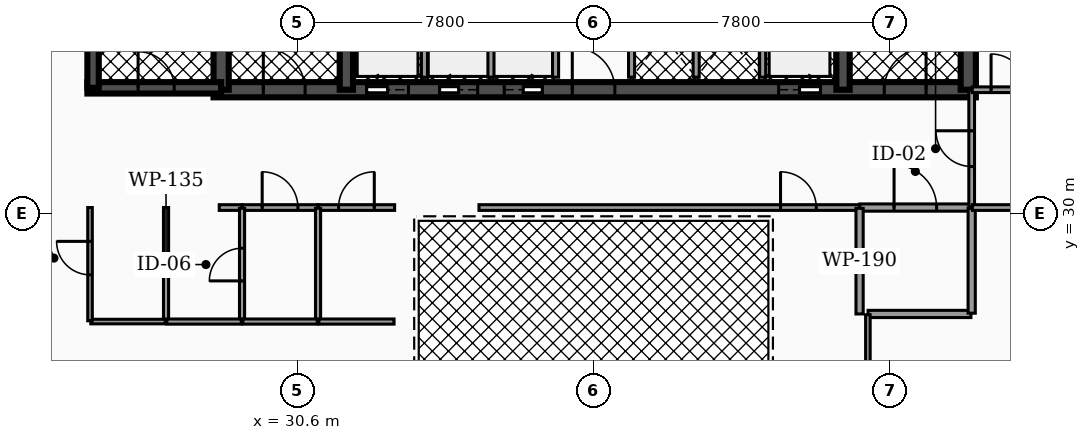
"""IFC4 building model, lengths in metres.
Left out: names, types, materials, properties, quantities, classifications, styles, units other than length and angle.
Written with IfcOpenShell. Run it as: python <this file> out.ifc"""

import sys

from ifc_helpers import new_model, si_unit, direction, frame, frame_2d, origin, place, context, subcontext, project, spatial, rectangle, extrude, element, fill, save


model = new_model("IFC4")
c1 = context("Model", 3, precision=1e-05, world=origin(), true_north=direction((0.0, 1.0)))
c2 = subcontext(c1, "Body", "Model", "MODEL_VIEW")
j1 = project(units=[si_unit("LENGTHUNIT", "METRE"), si_unit("PLANEANGLEUNIT", "RADIAN")], contexts=[c1])
p1 = place(None, origin())
s1 = spatial("IfcSite", under=j1, at=p1, CompositionType="ELEMENT")
p2 = place(p1, origin())
s2 = spatial("IfcBuilding", under=s1, at=p2, CompositionType="ELEMENT")
p3 = place(p2, frame((0.0, 0.0, 145.86)))
s3 = spatial("IfcBuildingStorey", under=s2, at=p3, CompositionType="ELEMENT", Elevation=145.86)
p4 = place(p3, frame((28.4, 33.25, 0.0), z_axis=(0.0, 0.0, 1.0), x_axis=(1.0, 0.0, 0.0)))
e1 = element("IfcWall", 1, at=p4, inside=s3, PredefinedType="SHEAR", context=c2, shape_type="SweptSolid", body=[
    extrude(rectangle(XDim=20.06, YDim=0.4, at=frame_2d((10.03, 0.0))), origin(), (0.0, 0.0, 1.0), 3.5),
])
p5 = place(p4, frame((4.03, 0.0, 0.0)))
e2 = element("IfcOpeningElement", 2, at=p5, cuts=e1, PredefinedType="OPENING", context=c2, shape_type="SweptSolid", body=[
    extrude(rectangle(XDim=1.1, YDim=2.15, at=frame_2d((0.55, 1.075))), frame((0.0, 0.21, 0.0), z_axis=(0.0, -1.0, 0.0), x_axis=(1.0, 0.0, 0.0)), (0.0, 0.0, 1.0), 0.42),
])
p6 = place(p4, frame((14.87, 0.0, 0.0)))
e3 = element("IfcOpeningElement", 3, at=p6, cuts=e1, PredefinedType="OPENING", context=c2, shape_type="SweptSolid", body=[
    extrude(rectangle(XDim=1.1, YDim=2.15, at=frame_2d((0.55, 1.075))), frame((0.0, 0.21, 0.0), z_axis=(0.0, -1.0, 0.0), x_axis=(1.0, 0.0, 0.0)), (0.0, 0.0, 1.0), 0.42),
])
p7 = place(p4, frame((5.95, 0.0, 0.0)))
e4 = element("IfcOpeningElement", 4, at=p7, cuts=e1, PredefinedType="OPENING", context=c2, shape_type="SweptSolid", body=[
    extrude(rectangle(XDim=1.0, YDim=2.1, at=frame_2d((0.5, 1.05))), frame((0.0, 0.21, 0.0), z_axis=(0.0, -1.0, 0.0), x_axis=(1.0, 0.0, 0.0)), (0.0, 0.0, 1.0), 0.42),
])
p8 = place(p4, frame((7.65, 0.0, 0.0)))
e5 = element("IfcOpeningElement", 5, at=p8, cuts=e1, PredefinedType="OPENING", context=c2, shape_type="SweptSolid", body=[
    extrude(rectangle(XDim=1.0, YDim=2.1, at=frame_2d((0.5, 1.05))), frame((0.0, 0.21, 0.0), z_axis=(0.0, -1.0, 0.0), x_axis=(1.0, 0.0, 0.0)), (0.0, 0.0, 1.0), 0.42),
])
p9 = place(p4, frame((1.31, 0.0, 0.0)))
e6 = element("IfcOpeningElement", 6, at=p9, cuts=e1, PredefinedType="OPENING", context=c2, shape_type="SweptSolid", body=[
    extrude(rectangle(XDim=1.1, YDim=2.2, at=frame_2d((0.55, 1.1))), frame((0.0, 0.21, 0.0), z_axis=(0.0, -1.0, 0.0), x_axis=(1.0, 0.0, 0.0)), (0.0, 0.0, 1.0), 0.42),
])
p10 = place(p4, frame((9.44, 0.0, 0.0)))
e7 = element("IfcOpeningElement", 7, at=p10, cuts=e1, PredefinedType="OPENING", context=c2, shape_type="SweptSolid", body=[
    extrude(rectangle(XDim=1.12, YDim=2.05, at=frame_2d((0.56, 1.025))), frame((0.0, 0.21, 0.0), z_axis=(0.0, -1.0, 0.0), x_axis=(1.0, 0.0, 0.0)), (0.0, 0.0, 1.0), 0.42),
])
p11 = place(p4, frame((17.65, 0.0, 0.0)))
e8 = element("IfcOpeningElement", 8, at=p11, cuts=e1, PredefinedType="OPENING", context=c2, shape_type="SweptSolid", body=[
    extrude(rectangle(XDim=1.1, YDim=2.2, at=frame_2d((0.55, 1.1))), frame((0.0, 0.21, 0.0), z_axis=(0.0, -1.0, 0.0), x_axis=(1.0, 0.0, 0.0)), (0.0, 0.0, 1.0), 0.42),
])
p12 = place(p3, frame((28.6, 33.25, 0.0), z_axis=(0.0, 0.0, 1.0), x_axis=(0.0, 1.0, 0.0)))
e9 = element("IfcWall", 9, at=p12, inside=s3, PredefinedType="SHEAR", context=c2, shape_type="SweptSolid", body=[
    extrude(rectangle(XDim=10.2, YDim=0.4, at=frame_2d((5.1, 0.0))), origin(), (0.0, 0.0, 1.0), 3.5),
])
for number, where, z_axis, x_axis in (
    (10, (31.895, 33.25, 0.0), (0.0, 0.0, 1.0), (0.0, 1.0, 0.0)),
    (11, (44.965, 33.25, 0.0), (0.0, 0.0, 1.0), (0.0, 1.0, 0.0)),
):
    element("IfcWall", number, at=place(p3, frame(where, z_axis=z_axis, x_axis=x_axis)), inside=s3, PredefinedType="SHEAR", context=c2, shape_type="SweptSolid", body=[
        extrude(rectangle(XDim=10.2, YDim=0.35, at=frame_2d((5.1, 0.0))), origin(), (0.0, 0.0, 1.0), 3.5),
    ])
p13 = place(p3, frame((48.26, 33.25, 0.0), z_axis=(0.0, 0.0, 1.0), x_axis=(0.0, 1.0, 0.0)))
e12 = element("IfcWall", 12, at=p13, inside=s3, PredefinedType="SHEAR", context=c2, shape_type="SweptSolid", body=[
    extrude(rectangle(XDim=10.2, YDim=0.4, at=frame_2d((5.1, 0.0))), origin(), (0.0, 0.0, 1.0), 3.5),
])
p14 = place(p3, frame((25.08, 33.3, 0.0), z_axis=(0.0, 0.0, 1.0), x_axis=(1.0, 0.0, 0.0)))
e13 = element("IfcWall", 13, at=p14, inside=s3, PredefinedType="SHEAR", context=c2, shape_type="SweptSolid", body=[
    extrude(rectangle(XDim=3.52, YDim=0.3, at=frame_2d((1.76, 0.0))), origin(), (0.0, 0.0, 1.0), 3.5),
])
p15 = place(p14, frame((1.335, 0.0, 0.0)))
e14 = element("IfcOpeningElement", 14, at=p15, cuts=e13, PredefinedType="OPENING", context=c2, shape_type="SweptSolid", body=[
    extrude(rectangle(XDim=0.95, YDim=2.2, at=frame_2d((0.475, 1.1))), frame((0.0, 0.16, 0.0), z_axis=(0.0, -1.0, 0.0), x_axis=(1.0, 0.0, 0.0)), (0.0, 0.0, 1.0), 0.32),
])
p16 = place(p3, frame((25.23, 33.3, 0.0), z_axis=(0.0, 0.0, 1.0), x_axis=(0.0, 1.0, 0.0)))
e15 = element("IfcWall", 15, at=p16, inside=s3, PredefinedType="SHEAR", context=c2, shape_type="SweptSolid", body=[
    extrude(rectangle(XDim=7.6, YDim=0.3, at=frame_2d((3.8, 0.0))), origin(), (0.0, 0.0, 1.0), 3.5),
])
for number, where, z_axis, x_axis in (
    (16, (33.95, 33.58, 0.0), (0.0, 0.0, 1.0), (0.0, 1.0, 0.0)),
    (17, (42.85, 33.58, 0.0), (0.0, 0.0, 1.0), (0.0, 1.0, 0.0)),
):
    element("IfcWall", number, at=place(p3, frame(where, z_axis=z_axis, x_axis=x_axis)), inside=s3, PredefinedType="SOLIDWALL", context=c2, shape_type="SweptSolid", body=[
        extrude(rectangle(XDim=2.45, YDim=0.16, at=frame_2d((1.225, 0.0))), origin(), (0.0, 0.0, 1.0), 2.472),
    ])
for number, where, z_axis, x_axis in (
    (18, (35.7, 33.58, 0.0), (0.0, 0.0, 1.0), (0.0, 1.0, 0.0)),
    (19, (37.4, 33.58, 0.0), (0.0, 0.0, 1.0), (0.0, 1.0, 0.0)),
    (20, (39.4, 33.58, 0.0), (0.0, 0.0, 1.0), (0.0, 1.0, 0.0)),
    (21, (41.1, 33.58, 0.0), (0.0, 0.0, 1.0), (0.0, 1.0, 0.0)),
):
    element("IfcWall", number, at=place(p3, frame(where, z_axis=z_axis, x_axis=x_axis)), inside=s3, PredefinedType="SOLIDWALL", context=c2, shape_type="SweptSolid", body=[
        extrude(rectangle(XDim=2.25, YDim=0.16, at=frame_2d((1.125, 0.0))), origin(), (0.0, 0.0, 1.0), 2.472),
    ])
p17 = place(p3, frame((45.405, 30.15, 0.0), z_axis=(0.0, 0.0, 1.0), x_axis=(1.0, 0.0, 0.0)))
e22 = element("IfcWall", 22, at=p17, inside=s3, PredefinedType="PARTITIONING", context=c2, shape_type="SweptSolid", body=[
    extrude(rectangle(XDim=2.925, YDim=0.19, at=frame_2d((1.462, 0.0))), origin(), (0.0, 0.0, 1.0), 2.457),
])
p18 = place(p17, frame((0.903, 0.0, 0.0)))
e23 = element("IfcOpeningElement", 23, at=p18, cuts=e22, PredefinedType="OPENING", context=c2, shape_type="SweptSolid", body=[
    extrude(rectangle(XDim=1.12, YDim=2.05, at=frame_2d((0.56, 1.025))), frame((0.0, 0.105, 0.0), z_axis=(0.0, -1.0, 0.0), x_axis=(1.0, 0.0, 0.0)), (0.0, 0.0, 1.0), 0.21),
])
p19 = place(p3, frame((48.35, 30.17, 0.0), z_axis=(0.0, 0.0, 1.0), x_axis=(0.0, 1.0, 0.0)))
e24 = element("IfcWall", 24, at=p19, inside=s3, PredefinedType="PARTITIONING", context=c2, shape_type="SweptSolid", body=[
    extrude(rectangle(XDim=3.06, YDim=0.15, at=frame_2d((1.53, 0.0))), origin(), (0.0, 0.0, 1.0), 2.457),
])
p20 = place(p19, frame((1.06, 0.0, 0.0)))
e25 = element("IfcOpeningElement", 25, at=p20, cuts=e24, PredefinedType="OPENING", context=c2, shape_type="SweptSolid", body=[
    extrude(rectangle(XDim=0.94, YDim=2.05, at=frame_2d((0.47, 1.025))), frame((0.0, 0.085, 0.0), z_axis=(0.0, -1.0, 0.0), x_axis=(1.0, 0.0, 0.0)), (0.0, 0.0, 1.0), 0.17),
])
p21 = place(p3, frame((28.55, 30.15, 0.0), z_axis=(0.0, 0.0, 1.0), x_axis=(1.0, 0.0, 0.0)))
e26 = element("IfcWall", 26, at=p21, inside=s3, PredefinedType="PARTITIONING", context=c2, shape_type="SweptSolid", body=[
    extrude(rectangle(XDim=0.595, YDim=0.15, at=frame_2d((0.297, 0.0))), origin(), (0.0, 0.0, 1.0), 2.457),
])
p22 = place(p3, frame((29.155, 30.15, 0.0), z_axis=(0.0, 0.0, 1.0), x_axis=(1.0, 0.0, 0.0)))
e27 = element("IfcWall", 27, at=p22, inside=s3, PredefinedType="PARTITIONING", context=c2, shape_type="SweptSolid", body=[
    extrude(rectangle(XDim=1.99, YDim=0.15, at=frame_2d((0.995, 0.0))), origin(), (0.0, 0.0, 1.0), 2.457),
])
p23 = place(p22, frame((0.525, 0.0, 0.0)))
e28 = element("IfcOpeningElement", 28, at=p23, cuts=e27, PredefinedType="OPENING", context=c2, shape_type="SweptSolid", body=[
    extrude(rectangle(XDim=0.94, YDim=2.05, at=frame_2d((0.47, 1.025))), frame((0.0, 0.085, 0.0), z_axis=(0.0, -1.0, 0.0), x_axis=(1.0, 0.0, 0.0)), (0.0, 0.0, 1.0), 0.17),
])
p24 = place(p3, frame((31.155, 30.15, 0.0), z_axis=(0.0, 0.0, 1.0), x_axis=(1.0, 0.0, 0.0)))
e29 = element("IfcWall", 29, at=p24, inside=s3, PredefinedType="PARTITIONING", context=c2, shape_type="SweptSolid", body=[
    extrude(rectangle(XDim=2.01, YDim=0.15, at=frame_2d((1.005, 0.0))), origin(), (0.0, 0.0, 1.0), 2.457),
])
p25 = place(p24, frame((0.535, 0.0, 0.0)))
e30 = element("IfcOpeningElement", 30, at=p25, cuts=e29, PredefinedType="OPENING", context=c2, shape_type="SweptSolid", body=[
    extrude(rectangle(XDim=0.94, YDim=2.05, at=frame_2d((0.47, 1.025))), frame((0.0, 0.085, 0.0), z_axis=(0.0, -1.0, 0.0), x_axis=(1.0, 0.0, 0.0)), (0.0, 0.0, 1.0), 0.17),
])
p26 = place(p3, frame((35.385, 30.15, 0.0), z_axis=(0.0, 0.0, 1.0), x_axis=(1.0, 0.0, 0.0)))
e31 = element("IfcWall", 31, at=p26, inside=s3, PredefinedType="PARTITIONING", context=c2, shape_type="SweptSolid", body=[
    extrude(rectangle(XDim=10.01, YDim=0.15, at=frame_2d((5.005, 0.0))), origin(), (0.0, 0.0, 1.0), 2.457),
])
p27 = place(p26, frame((7.935, 0.0, 0.0)))
e32 = element("IfcOpeningElement", 32, at=p27, cuts=e31, PredefinedType="OPENING", context=c2, shape_type="SweptSolid", body=[
    extrude(rectangle(XDim=0.94, YDim=2.05, at=frame_2d((0.47, 1.025))), frame((0.0, 0.085, 0.0), z_axis=(0.0, -1.0, 0.0), x_axis=(1.0, 0.0, 0.0)), (0.0, 0.0, 1.0), 0.17),
])
p28 = place(p3, frame((45.4, 27.35, 0.0), z_axis=(0.0, 0.0, 1.0), x_axis=(0.0, 1.0, 0.0)))
e33 = element("IfcWall", 33, at=p28, inside=s3, PredefinedType="PARTITIONING", context=c2, shape_type="SweptSolid", body=[
    extrude(rectangle(XDim=2.78, YDim=0.19, at=frame_2d((1.39, 0.0))), origin(), (0.0, 0.0, 1.0), 2.457),
])
p29 = place(p3, frame((45.624, 27.35, 0.0), z_axis=(0.0, 0.0, 1.0), x_axis=(1.0, 0.0, 0.0)))
e34 = element("IfcWall", 34, at=p29, inside=s3, PredefinedType="PARTITIONING", context=c2, shape_type="SweptSolid", body=[
    extrude(rectangle(XDim=2.706, YDim=0.19, at=frame_2d((1.353, 0.0))), origin(), (0.0, 0.0, 1.0), 2.457),
])
p30 = place(p3, frame((48.35, 27.37, 0.0), z_axis=(0.0, 0.0, 1.0), x_axis=(0.0, 1.0, 0.0)))
e35 = element("IfcWall", 35, at=p30, inside=s3, PredefinedType="PARTITIONING", context=c2, shape_type="SweptSolid", body=[
    extrude(rectangle(XDim=2.76, YDim=0.19, at=frame_2d((1.38, 0.0))), origin(), (0.0, 0.0, 1.0), 2.457),
])
p31 = place(p3, frame((48.37, 30.15, 0.0), z_axis=(0.0, 0.0, 1.0), x_axis=(1.0, 0.0, 0.0)))
e36 = element("IfcWall", 36, at=p31, inside=s3, PredefinedType="PARTITIONING", context=c2, shape_type="SweptSolid", body=[
    extrude(rectangle(XDim=3.26, YDim=0.15, at=frame_2d((1.63, 0.0))), origin(), (0.0, 0.0, 1.0), 2.457),
])
p32 = place(p31, frame((1.16, 0.0, 0.0)))
e37 = element("IfcOpeningElement", 37, at=p32, cuts=e36, PredefinedType="OPENING", context=c2, shape_type="SweptSolid", body=[
    extrude(rectangle(XDim=0.94, YDim=2.05, at=frame_2d((0.47, 1.025))), frame((0.0, 0.085, 0.0), z_axis=(0.0, -1.0, 0.0), x_axis=(1.0, 0.0, 0.0)), (0.0, 0.0, 1.0), 0.17),
])
p33 = place(p3, frame((48.365, 33.25, 0.0), z_axis=(0.0, 0.0, 1.0), x_axis=(1.0, 0.0, 0.0)))
e38 = element("IfcWall", 38, at=p33, inside=s3, PredefinedType="PARTITIONING", context=c2, shape_type="SweptSolid", body=[
    extrude(rectangle(XDim=1.93, YDim=0.15, at=frame_2d((0.965, 0.0))), origin(), (0.0, 0.0, 1.0), 2.457),
])
p34 = place(p33, frame((0.495, 0.0, 0.0)))
e39 = element("IfcOpeningElement", 39, at=p34, cuts=e38, PredefinedType="OPENING", context=c2, shape_type="SweptSolid", body=[
    extrude(rectangle(XDim=0.94, YDim=2.05, at=frame_2d((0.47, 1.025))), frame((0.0, 0.085, 0.0), z_axis=(0.0, -1.0, 0.0), x_axis=(1.0, 0.0, 0.0)), (0.0, 0.0, 1.0), 0.17),
])
p35 = place(p3, frame((27.15, 27.17, 0.0), z_axis=(0.0, 0.0, 1.0), x_axis=(0.0, 1.0, 0.0)))
e40 = element("IfcWall", 40, at=p35, inside=s3, PredefinedType="PARTITIONING", context=c2, shape_type="SweptSolid", body=[
    extrude(rectangle(XDim=2.98, YDim=0.135, at=frame_2d((1.49, 0.0))), origin(), (0.0, 0.0, 1.0), 2.457),
])
p36 = place(p3, frame((25.17, 27.15, 0.0), z_axis=(0.0, 0.0, 1.0), x_axis=(1.0, 0.0, 0.0)))
e41 = element("IfcWall", 41, at=p36, inside=s3, PredefinedType="PARTITIONING", context=c2, shape_type="SweptSolid", body=[
    extrude(rectangle(XDim=1.96, YDim=0.12, at=frame_2d((0.98, 0.0))), origin(), (0.0, 0.0, 1.0), 2.457),
])
p37 = place(p3, frame((25.15, 27.17, 0.0), z_axis=(0.0, 0.0, 1.0), x_axis=(0.0, 1.0, 0.0)))
e42 = element("IfcWall", 42, at=p37, inside=s3, PredefinedType="PARTITIONING", context=c2, shape_type="SweptSolid", body=[
    extrude(rectangle(XDim=2.98, YDim=0.12, at=frame_2d((1.49, 0.0))), origin(), (0.0, 0.0, 1.0), 2.457),
])
p38 = place(p37, frame((1.21, 0.0, 0.0)))
e43 = element("IfcOpeningElement", 43, at=p38, cuts=e42, PredefinedType="OPENING", context=c2, shape_type="SweptSolid", body=[
    extrude(rectangle(XDim=0.88, YDim=2.05, at=frame_2d((0.44, 1.025))), frame((0.0, 0.07, 0.0), z_axis=(0.0, -1.0, 0.0), x_axis=(1.0, 0.0, 0.0)), (0.0, 0.0, 1.0), 0.14),
])
p39 = place(p3, frame((29.15, 27.17, 0.0), z_axis=(0.0, 0.0, 1.0), x_axis=(0.0, 1.0, 0.0)))
e44 = element("IfcWall", 44, at=p39, inside=s3, PredefinedType="PARTITIONING", context=c2, shape_type="SweptSolid", body=[
    extrude(rectangle(XDim=2.96, YDim=0.135, at=frame_2d((1.48, 0.0))), origin(), (0.0, 0.0, 1.0), 2.457),
])
p40 = place(p39, frame((1.05, 0.0, 0.0)))
e45 = element("IfcOpeningElement", 45, at=p40, cuts=e44, PredefinedType="OPENING", context=c2, shape_type="SweptSolid", body=[
    extrude(rectangle(XDim=0.86, YDim=2.05, at=frame_2d((0.43, 1.025))), frame((0.0, 0.077, 0.0), z_axis=(0.0, -1.0, 0.0), x_axis=(1.0, 0.0, 0.0)), (0.0, 0.0, 1.0), 0.155),
])
p41 = place(p3, frame((27.17, 27.15, 0.0), z_axis=(0.0, 0.0, 1.0), x_axis=(1.0, 0.0, 0.0)))
e46 = element("IfcWall", 46, at=p41, inside=s3, PredefinedType="PARTITIONING", context=c2, shape_type="SweptSolid", body=[
    extrude(rectangle(XDim=1.96, YDim=0.135, at=frame_2d((0.98, 0.0))), origin(), (0.0, 0.0, 1.0), 2.457),
])
p42 = place(p3, frame((31.15, 27.17, 0.0), z_axis=(0.0, 0.0, 1.0), x_axis=(0.0, 1.0, 0.0)))
e47 = element("IfcWall", 47, at=p42, inside=s3, PredefinedType="PARTITIONING", context=c2, shape_type="SweptSolid", body=[
    extrude(rectangle(XDim=2.96, YDim=0.135, at=frame_2d((1.48, 0.0))), origin(), (0.0, 0.0, 1.0), 2.457),
])
p43 = place(p3, frame((29.17, 27.15, 0.0), z_axis=(0.0, 0.0, 1.0), x_axis=(1.0, 0.0, 0.0)))
e48 = element("IfcWall", 48, at=p43, inside=s3, PredefinedType="PARTITIONING", context=c2, shape_type="SweptSolid", body=[
    extrude(rectangle(XDim=1.96, YDim=0.135, at=frame_2d((0.98, 0.0))), origin(), (0.0, 0.0, 1.0), 2.457),
])
p44 = place(p3, frame((31.17, 27.15, 0.0), z_axis=(0.0, 0.0, 1.0), x_axis=(1.0, 0.0, 0.0)))
e49 = element("IfcWall", 49, at=p44, inside=s3, PredefinedType="PARTITIONING", context=c2, shape_type="SweptSolid", body=[
    extrude(rectangle(XDim=1.98, YDim=0.135, at=frame_2d((0.99, 0.0))), origin(), (0.0, 0.0, 1.0), 2.457),
])
p45 = place(p3, frame((45.619, 17.846, 0.0), z_axis=(0.0, 0.0, 1.0), x_axis=(0.0, 1.0, 0.0)))
e50 = element("IfcWall", 50, at=p45, inside=s3, PredefinedType="PARTITIONING", context=c2, shape_type="SweptSolid", body=[
    extrude(rectangle(XDim=9.484, YDim=0.12, at=frame_2d((4.742, 0.0))), origin(), (0.0, 0.0, 1.0), 2.457),
])
p46 = place(p5, origin())
e51 = element("IfcDoor", 51, at=p46, inside=s3, OperationType="SLIDING_TO_LEFT", PredefinedType="DOOR", context=c2, shape_type="SweptSolid", body=[
    extrude(rectangle(XDim=1.1, YDim=2.15, at=frame_2d((0.55, 1.075))), frame((0.0, 0.025, 0.0), z_axis=(0.0, -1.0, 0.0), x_axis=(1.0, 0.0, 0.0)), (0.0, 0.0, 1.0), 0.05),
])
fill(e2, e51)
p47 = place(p6, origin())
e52 = element("IfcDoor", 52, at=p47, inside=s3, OperationType="SLIDING_TO_RIGHT", PredefinedType="DOOR", context=c2, shape_type="SweptSolid", body=[
    extrude(rectangle(XDim=1.1, YDim=2.15, at=frame_2d((0.55, 1.075))), frame((0.0, 0.025, 0.0), z_axis=(0.0, -1.0, 0.0), x_axis=(1.0, 0.0, 0.0)), (0.0, 0.0, 1.0), 0.05),
])
fill(e3, e52)
p48 = place(p7, origin())
e53 = element("IfcDoor", 53, at=p48, inside=s3, OperationType="SLIDING_TO_LEFT", PredefinedType="DOOR", context=c2, shape_type="SweptSolid", body=[
    extrude(rectangle(XDim=1.0, YDim=2.1, at=frame_2d((0.5, 1.05))), frame((0.0, 0.025, 0.0), z_axis=(0.0, -1.0, 0.0), x_axis=(1.0, 0.0, 0.0)), (0.0, 0.0, 1.0), 0.05),
])
fill(e4, e53)
p49 = place(p8, origin())
e54 = element("IfcDoor", 54, at=p49, inside=s3, OperationType="SLIDING_TO_RIGHT", PredefinedType="DOOR", context=c2, shape_type="SweptSolid", body=[
    extrude(rectangle(XDim=1.0, YDim=2.1, at=frame_2d((0.5, 1.05))), frame((0.0, 0.025, 0.0), z_axis=(0.0, -1.0, 0.0), x_axis=(1.0, 0.0, 0.0)), (0.0, 0.0, 1.0), 0.05),
])
fill(e5, e54)
p50 = place(p9, origin())
e55 = element("IfcDoor", 55, at=p50, inside=s3, OperationType="SINGLE_SWING_LEFT", PredefinedType="DOOR", context=c2, shape_type="SweptSolid", body=[
    extrude(rectangle(XDim=1.1, YDim=2.2, at=frame_2d((0.55, 1.1))), frame((0.0, 0.025, 0.0), z_axis=(0.0, -1.0, 0.0), x_axis=(1.0, 0.0, 0.0)), (0.0, 0.0, 1.0), 0.05),
])
fill(e6, e55)
p51 = place(p10, origin())
e56 = element("IfcDoor", 56, at=p51, inside=s3, OperationType="SINGLE_SWING_LEFT", PredefinedType="DOOR", context=c2, shape_type="SweptSolid", body=[
    extrude(rectangle(XDim=1.12, YDim=2.05, at=frame_2d((0.56, 1.025))), frame((0.0, 0.025, 0.0), z_axis=(0.0, -1.0, 0.0), x_axis=(1.0, 0.0, 0.0)), (0.0, 0.0, 1.0), 0.05),
])
fill(e7, e56)
p52 = place(p11, origin())
e57 = element("IfcDoor", 57, at=p52, inside=s3, OperationType="SINGLE_SWING_RIGHT", PredefinedType="DOOR", context=c2, shape_type="SweptSolid", body=[
    extrude(rectangle(XDim=1.1, YDim=2.2, at=frame_2d((0.55, 1.1))), frame((0.0, 0.025, 0.0), z_axis=(0.0, -1.0, 0.0), x_axis=(1.0, 0.0, 0.0)), (0.0, 0.0, 1.0), 0.05),
])
fill(e8, e57)
p53 = place(p15, origin())
e58 = element("IfcDoor", 58, at=p53, inside=s3, OperationType="SINGLE_SWING_LEFT", PredefinedType="DOOR", context=c2, shape_type="SweptSolid", body=[
    extrude(rectangle(XDim=0.95, YDim=2.2, at=frame_2d((0.475, 1.1))), frame((0.0, 0.025, 0.0), z_axis=(0.0, -1.0, 0.0), x_axis=(1.0, 0.0, 0.0)), (0.0, 0.0, 1.0), 0.05),
])
fill(e14, e58)
p54 = place(p18, origin())
e59 = element("IfcDoor", 59, at=p54, inside=s3, OperationType="SINGLE_SWING_LEFT", PredefinedType="DOOR", context=c2, shape_type="SweptSolid", body=[
    extrude(rectangle(XDim=1.12, YDim=2.05, at=frame_2d((0.56, 1.025))), frame((0.0, 0.025, 0.0), z_axis=(0.0, -1.0, 0.0), x_axis=(1.0, 0.0, 0.0)), (0.0, 0.0, 1.0), 0.05),
])
fill(e23, e59)
p55 = place(p20, origin())
e60 = element("IfcDoor", 60, at=p55, inside=s3, OperationType="SINGLE_SWING_RIGHT", PredefinedType="DOOR", context=c2, shape_type="SweptSolid", body=[
    extrude(rectangle(XDim=0.94, YDim=2.05, at=frame_2d((0.47, 1.025))), frame((0.0, 0.025, 0.0), z_axis=(0.0, -1.0, 0.0), x_axis=(1.0, 0.0, 0.0)), (0.0, 0.0, 1.0), 0.05),
])
fill(e25, e60)
p56 = place(p23, origin())
e61 = element("IfcDoor", 61, at=p56, inside=s3, OperationType="SINGLE_SWING_LEFT", PredefinedType="DOOR", context=c2, shape_type="SweptSolid", body=[
    extrude(rectangle(XDim=0.94, YDim=2.05, at=frame_2d((0.47, 1.025))), frame((0.0, 0.025, 0.0), z_axis=(0.0, -1.0, 0.0), x_axis=(1.0, 0.0, 0.0)), (0.0, 0.0, 1.0), 0.05),
])
fill(e28, e61)
p57 = place(p25, origin())
e62 = element("IfcDoor", 62, at=p57, inside=s3, OperationType="SINGLE_SWING_RIGHT", PredefinedType="DOOR", context=c2, shape_type="SweptSolid", body=[
    extrude(rectangle(XDim=0.94, YDim=2.05, at=frame_2d((0.47, 1.025))), frame((0.0, 0.025, 0.0), z_axis=(0.0, -1.0, 0.0), x_axis=(1.0, 0.0, 0.0)), (0.0, 0.0, 1.0), 0.05),
])
fill(e30, e62)
p58 = place(p27, origin())
e63 = element("IfcDoor", 63, at=p58, inside=s3, OperationType="SINGLE_SWING_LEFT", PredefinedType="DOOR", context=c2, shape_type="SweptSolid", body=[
    extrude(rectangle(XDim=0.94, YDim=2.05, at=frame_2d((0.47, 1.025))), frame((0.0, 0.025, 0.0), z_axis=(0.0, -1.0, 0.0), x_axis=(1.0, 0.0, 0.0)), (0.0, 0.0, 1.0), 0.05),
])
fill(e32, e63)
p59 = place(p34, origin())
e64 = element("IfcDoor", 64, at=p59, inside=s3, OperationType="SINGLE_SWING_LEFT", PredefinedType="DOOR", context=c2, shape_type="SweptSolid", body=[
    extrude(rectangle(XDim=0.94, YDim=2.05, at=frame_2d((0.47, 1.025))), frame((0.0, 0.025, 0.0), z_axis=(0.0, -1.0, 0.0), x_axis=(1.0, 0.0, 0.0)), (0.0, 0.0, 1.0), 0.05),
])
fill(e39, e64)
p60 = place(p38, origin())
e65 = element("IfcDoor", 65, at=p60, inside=s3, OperationType="SINGLE_SWING_RIGHT", PredefinedType="DOOR", context=c2, shape_type="SweptSolid", body=[
    extrude(rectangle(XDim=0.88, YDim=2.05, at=frame_2d((0.44, 1.025))), frame((0.0, 0.025, 0.0), z_axis=(0.0, -1.0, 0.0), x_axis=(1.0, 0.0, 0.0)), (0.0, 0.0, 1.0), 0.05),
])
fill(e43, e65)
p61 = place(p40, origin())
e66 = element("IfcDoor", 66, at=p61, inside=s3, OperationType="SINGLE_SWING_LEFT", PredefinedType="DOOR", context=c2, shape_type="SweptSolid", body=[
    extrude(rectangle(XDim=0.86, YDim=2.05, at=frame_2d((0.43, 1.025))), frame((0.0, 0.025, 0.0), z_axis=(0.0, -1.0, 0.0), x_axis=(1.0, 0.0, 0.0)), (0.0, 0.0, 1.0), 0.05),
])
fill(e45, e66)
save(model, sys.argv[1])
